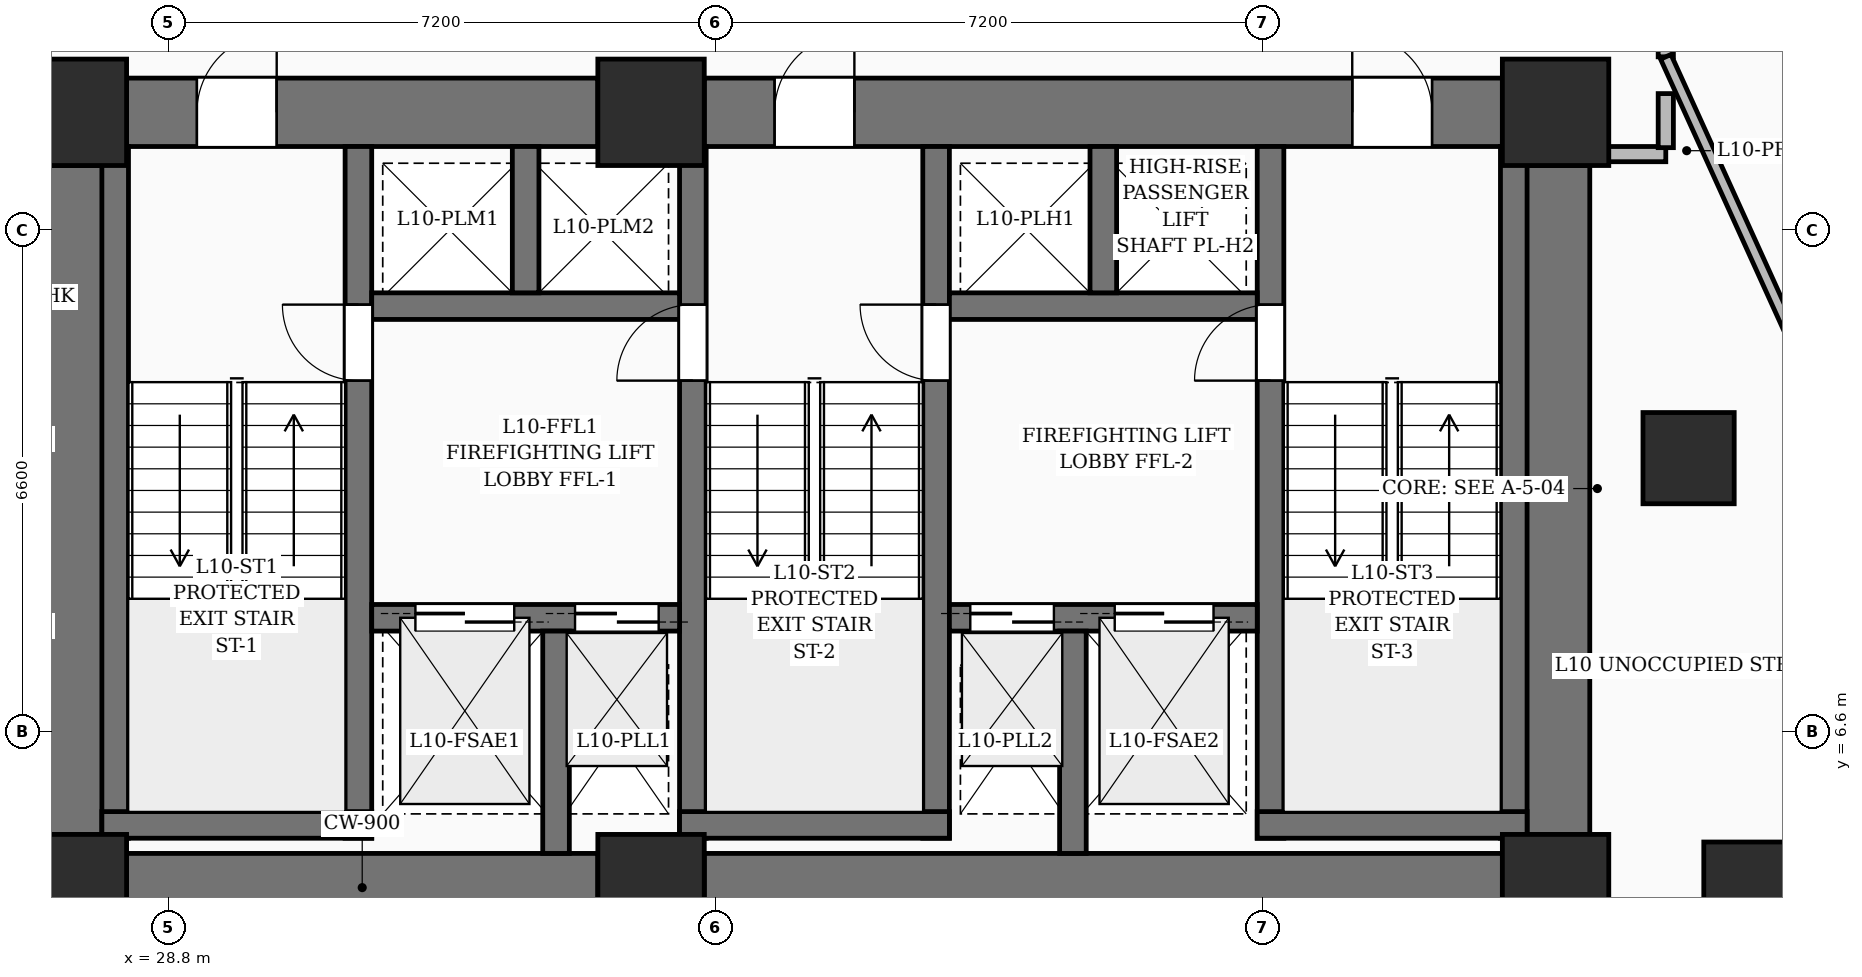
"""IFC4 building model, lengths in metres.
Left out: names, types, materials, properties, quantities, classifications, styles, units other than length and angle.
Written with IfcOpenShell. Run it as: python <this file> out.ifc"""

import sys

from ifc_helpers import new_model, si_unit, direction, frame, frame_2d, origin, origin_2d, place, context, subcontext, project, spatial, rectangle, extrude, element, fill, save


model = new_model("IFC4")
c1 = context("Model", 3, precision=1e-05, world=origin(), true_north=direction((0.0, 1.0)))
c2 = subcontext(c1, "Body", "Model", "MODEL_VIEW")
j1 = project(units=[si_unit("LENGTHUNIT", "METRE"), si_unit("PLANEANGLEUNIT", "RADIAN")], contexts=[c1])
p1 = place(None, origin())
s1 = spatial("IfcSite", under=j1, at=p1, CompositionType="ELEMENT")
p2 = place(p1, origin())
s2 = spatial("IfcBuilding", under=s1, at=p2, CompositionType="ELEMENT")
p3 = place(p2, frame((0.0, 0.0, 46.2)))
s3 = spatial("IfcBuildingStorey", under=s2, at=p3, CompositionType="ELEMENT", Elevation=46.2)
for number, where, z_axis, x_axis in (
    (1, (27.55, 4.55, 0.0), (0.0, 0.0, 1.0), (1.0, 0.0, 0.0)),
    (2, (35.15, 4.55, 0.0), (0.0, 0.0, 1.0), (1.0, 0.0, 0.0)),
    (3, (47.05, 4.55, 0.0), (0.0, 0.0, 1.0), (1.0, 0.0, 0.0)),
    (4, (27.55, 14.75, 0.0), (0.0, 0.0, 1.0), (1.0, 0.0, 0.0)),
    (5, (35.15, 14.75, 0.0), (0.0, 0.0, 1.0), (1.0, 0.0, 0.0)),
    (6, (47.05, 14.75, 0.0), (0.0, 0.0, 1.0), (1.0, 0.0, 0.0)),
):
    element("IfcColumn", number, at=place(p3, frame(where, z_axis=z_axis, x_axis=x_axis)), inside=s3, PredefinedType="COLUMN", context=c2, shape_type="SweptSolid", body=[
        extrude(rectangle(XDim=1.4, YDim=1.4, at=origin_2d()), origin(), (0.0, 0.0, 1.0), 3.6),
    ])
for number, where, z_axis, x_axis in (
    (7, (49.6, 4.55, 0.0), (0.0, 0.0, 1.0), (1.0, 0.0, 0.0)),
    (8, (48.8, 10.2, 0.0), (0.0, 0.0, 1.0), (1.0, 0.0, 0.0)),
):
    element("IfcColumn", number, at=place(p3, frame(where, z_axis=z_axis, x_axis=x_axis)), inside=s3, PredefinedType="COLUMN", context=c2, shape_type="SweptSolid", body=[
        extrude(rectangle(XDim=1.2, YDim=1.2, at=origin_2d()), origin(), (0.0, 0.0, 1.0), 3.6),
    ])
p4 = place(p3, frame((28.25, 4.55, 0.0), z_axis=(0.0, 0.0, 1.0), x_axis=(1.0, 0.0, 0.0)))
e9 = element("IfcWall", 9, at=p4, inside=s3, PredefinedType="SHEAR", context=c2, shape_type="SweptSolid", body=[
    extrude(rectangle(XDim=6.2, YDim=0.9, at=frame_2d((3.1, 0.0))), origin(), (0.0, 0.0, 1.0), 3.6),
])
p5 = place(p3, frame((35.85, 4.55, 0.0), z_axis=(0.0, 0.0, 1.0), x_axis=(1.0, 0.0, 0.0)))
e10 = element("IfcWall", 10, at=p5, inside=s3, PredefinedType="SHEAR", context=c2, shape_type="SweptSolid", body=[
    extrude(rectangle(XDim=10.5, YDim=0.9, at=frame_2d((5.25, 0.0))), origin(), (0.0, 0.0, 1.0), 3.6),
])
p6 = place(p3, frame((28.25, 14.75, 0.0), z_axis=(0.0, 0.0, 1.0), x_axis=(1.0, 0.0, 0.0)))
e11 = element("IfcWall", 11, at=p6, inside=s3, PredefinedType="SHEAR", context=c2, shape_type="SweptSolid", body=[
    extrude(rectangle(XDim=6.2, YDim=0.9, at=frame_2d((3.1, 0.0))), origin(), (0.0, 0.0, 1.0), 3.6),
])
p7 = place(p6, frame((0.925, 0.0, 0.0)))
e12 = element("IfcOpeningElement", 12, at=p7, cuts=e11, PredefinedType="OPENING", context=c2, shape_type="SweptSolid", body=[
    extrude(rectangle(XDim=1.05, YDim=2.15, at=frame_2d((0.525, 1.075))), frame((0.0, 0.46, 0.0), z_axis=(0.0, -1.0, 0.0), x_axis=(1.0, 0.0, 0.0)), (0.0, 0.0, 1.0), 0.92),
])
p8 = place(p3, frame((35.85, 14.75, 0.0), z_axis=(0.0, 0.0, 1.0), x_axis=(1.0, 0.0, 0.0)))
e13 = element("IfcWall", 13, at=p8, inside=s3, PredefinedType="SHEAR", context=c2, shape_type="SweptSolid", body=[
    extrude(rectangle(XDim=10.5, YDim=0.9, at=frame_2d((5.25, 0.0))), origin(), (0.0, 0.0, 1.0), 3.6),
])
p9 = place(p8, frame((0.925, 0.0, 0.0)))
e14 = element("IfcOpeningElement", 14, at=p9, cuts=e13, PredefinedType="OPENING", context=c2, shape_type="SweptSolid", body=[
    extrude(rectangle(XDim=1.05, YDim=2.15, at=frame_2d((0.525, 1.075))), frame((0.0, 0.46, 0.0), z_axis=(0.0, -1.0, 0.0), x_axis=(1.0, 0.0, 0.0)), (0.0, 0.0, 1.0), 0.92),
])
p10 = place(p8, frame((8.525, 0.0, 0.0)))
e15 = element("IfcOpeningElement", 15, at=p10, cuts=e13, PredefinedType="OPENING", context=c2, shape_type="SweptSolid", body=[
    extrude(rectangle(XDim=1.05, YDim=2.15, at=frame_2d((0.525, 1.075))), frame((0.0, 0.46, 0.0), z_axis=(0.0, -1.0, 0.0), x_axis=(1.0, 0.0, 0.0)), (0.0, 0.0, 1.0), 0.92),
])
for number, where, z_axis, x_axis in (
    (16, (27.55, 5.25, 0.0), (0.0, 0.0, 1.0), (0.0, 1.0, 0.0)),
    (17, (47.05, 5.25, 0.0), (0.0, 0.0, 1.0), (0.0, 1.0, 0.0)),
):
    element("IfcWall", number, at=place(p3, frame(where, z_axis=z_axis, x_axis=x_axis)), inside=s3, PredefinedType="SHEAR", context=c2, shape_type="SweptSolid", body=[
        extrude(rectangle(XDim=8.8, YDim=0.9, at=frame_2d((4.4, 0.0))), origin(), (0.0, 0.0, 1.0), 3.6),
    ])
p11 = place(p3, frame((28.1, 5.2, 0.0), z_axis=(0.0, 0.0, 1.0), x_axis=(0.0, 1.0, 0.0)))
e18 = element("IfcWall", 18, at=p11, inside=s3, PredefinedType="SOLIDWALL", context=c2, shape_type="SweptSolid", body=[
    extrude(rectangle(XDim=9.1, YDim=0.35, at=frame_2d((4.55, 0.0))), origin(), (0.0, 0.0, 1.0), 3.6),
])
p12 = place(p3, frame((31.3, 5.2, 0.0), z_axis=(0.0, 0.0, 1.0), x_axis=(0.0, 1.0, 0.0)))
e19 = element("IfcWall", 19, at=p12, inside=s3, PredefinedType="SOLIDWALL", context=c2, shape_type="SweptSolid", body=[
    extrude(rectangle(XDim=9.1, YDim=0.35, at=frame_2d((4.55, 0.0))), origin(), (0.0, 0.0, 1.0), 3.6),
])
p13 = place(p12, frame((6.02, 0.0, 0.0)))
e20 = element("IfcOpeningElement", 20, at=p13, cuts=e19, PredefinedType="OPENING", context=c2, shape_type="SweptSolid", body=[
    extrude(rectangle(XDim=1.0, YDim=2.15, at=frame_2d((0.5, 1.075))), frame((0.0, 0.185, 0.0), z_axis=(0.0, -1.0, 0.0), x_axis=(1.0, 0.0, 0.0)), (0.0, 0.0, 1.0), 0.37),
])
p14 = place(p3, frame((27.925, 5.375, 0.0), z_axis=(0.0, 0.0, 1.0), x_axis=(1.0, 0.0, 0.0)))
e21 = element("IfcWall", 21, at=p14, inside=s3, PredefinedType="SOLIDWALL", context=c2, shape_type="SweptSolid", body=[
    extrude(rectangle(XDim=3.55, YDim=0.35, at=frame_2d((1.775, 0.0))), origin(), (0.0, 0.0, 1.0), 3.6),
])
p15 = place(p3, frame((35.7, 5.2, 0.0), z_axis=(0.0, 0.0, 1.0), x_axis=(0.0, 1.0, 0.0)))
e22 = element("IfcWall", 22, at=p15, inside=s3, PredefinedType="SOLIDWALL", context=c2, shape_type="SweptSolid", body=[
    extrude(rectangle(XDim=9.1, YDim=0.35, at=frame_2d((4.55, 0.0))), origin(), (0.0, 0.0, 1.0), 3.6),
])
p16 = place(p15, frame((6.02, 0.0, 0.0)))
e23 = element("IfcOpeningElement", 23, at=p16, cuts=e22, PredefinedType="OPENING", context=c2, shape_type="SweptSolid", body=[
    extrude(rectangle(XDim=1.0, YDim=2.15, at=frame_2d((0.5, 1.075))), frame((0.0, 0.185, 0.0), z_axis=(0.0, -1.0, 0.0), x_axis=(1.0, 0.0, 0.0)), (0.0, 0.0, 1.0), 0.37),
])
p17 = place(p3, frame((38.9, 5.2, 0.0), z_axis=(0.0, 0.0, 1.0), x_axis=(0.0, 1.0, 0.0)))
e24 = element("IfcWall", 24, at=p17, inside=s3, PredefinedType="SOLIDWALL", context=c2, shape_type="SweptSolid", body=[
    extrude(rectangle(XDim=9.1, YDim=0.35, at=frame_2d((4.55, 0.0))), origin(), (0.0, 0.0, 1.0), 3.6),
])
p18 = place(p17, frame((6.02, 0.0, 0.0)))
e25 = element("IfcOpeningElement", 25, at=p18, cuts=e24, PredefinedType="OPENING", context=c2, shape_type="SweptSolid", body=[
    extrude(rectangle(XDim=1.0, YDim=2.15, at=frame_2d((0.5, 1.075))), frame((0.0, 0.185, 0.0), z_axis=(0.0, -1.0, 0.0), x_axis=(1.0, 0.0, 0.0)), (0.0, 0.0, 1.0), 0.37),
])
p19 = place(p3, frame((35.525, 5.375, 0.0), z_axis=(0.0, 0.0, 1.0), x_axis=(1.0, 0.0, 0.0)))
e26 = element("IfcWall", 26, at=p19, inside=s3, PredefinedType="SOLIDWALL", context=c2, shape_type="SweptSolid", body=[
    extrude(rectangle(XDim=3.55, YDim=0.35, at=frame_2d((1.775, 0.0))), origin(), (0.0, 0.0, 1.0), 3.6),
])
p20 = place(p3, frame((43.3, 5.2, 0.0), z_axis=(0.0, 0.0, 1.0), x_axis=(0.0, 1.0, 0.0)))
e27 = element("IfcWall", 27, at=p20, inside=s3, PredefinedType="SOLIDWALL", context=c2, shape_type="SweptSolid", body=[
    extrude(rectangle(XDim=9.1, YDim=0.35, at=frame_2d((4.55, 0.0))), origin(), (0.0, 0.0, 1.0), 3.6),
])
p21 = place(p20, frame((6.02, 0.0, 0.0)))
e28 = element("IfcOpeningElement", 28, at=p21, cuts=e27, PredefinedType="OPENING", context=c2, shape_type="SweptSolid", body=[
    extrude(rectangle(XDim=1.0, YDim=2.15, at=frame_2d((0.5, 1.075))), frame((0.0, 0.185, 0.0), z_axis=(0.0, -1.0, 0.0), x_axis=(1.0, 0.0, 0.0)), (0.0, 0.0, 1.0), 0.37),
])
p22 = place(p3, frame((46.5, 5.2, 0.0), z_axis=(0.0, 0.0, 1.0), x_axis=(0.0, 1.0, 0.0)))
e29 = element("IfcWall", 29, at=p22, inside=s3, PredefinedType="SOLIDWALL", context=c2, shape_type="SweptSolid", body=[
    extrude(rectangle(XDim=9.1, YDim=0.35, at=frame_2d((4.55, 0.0))), origin(), (0.0, 0.0, 1.0), 3.6),
])
p23 = place(p3, frame((43.125, 5.375, 0.0), z_axis=(0.0, 0.0, 1.0), x_axis=(1.0, 0.0, 0.0)))
e30 = element("IfcWall", 30, at=p23, inside=s3, PredefinedType="SOLIDWALL", context=c2, shape_type="SweptSolid", body=[
    extrude(rectangle(XDim=3.55, YDim=0.35, at=frame_2d((1.775, 0.0))), origin(), (0.0, 0.0, 1.0), 3.6),
])
p24 = place(p3, frame((31.475, 8.1, 0.0), z_axis=(0.0, 0.0, 1.0), x_axis=(1.0, 0.0, 0.0)))
e31 = element("IfcWall", 31, at=p24, inside=s3, PredefinedType="SOLIDWALL", context=c2, shape_type="SweptSolid", body=[
    extrude(rectangle(XDim=4.05, YDim=0.35, at=frame_2d((2.025, 0.0))), origin(), (0.0, 0.0, 1.0), 3.6),
])
p25 = place(p24, frame((0.575, 0.0, 0.0)))
e32 = element("IfcOpeningElement", 32, at=p25, cuts=e31, PredefinedType="OPENING", context=c2, shape_type="SweptSolid", body=[
    extrude(rectangle(XDim=1.3, YDim=2.25, at=frame_2d((0.65, 1.125))), frame((0.0, 0.185, 0.0), z_axis=(0.0, -1.0, 0.0), x_axis=(1.0, 0.0, 0.0)), (0.0, 0.0, 1.0), 0.37),
])
p26 = place(p24, frame((2.675, 0.0, 0.0)))
e33 = element("IfcOpeningElement", 33, at=p26, cuts=e31, PredefinedType="OPENING", context=c2, shape_type="SweptSolid", body=[
    extrude(rectangle(XDim=1.1, YDim=2.2, at=frame_2d((0.55, 1.1))), frame((0.0, 0.185, 0.0), z_axis=(0.0, -1.0, 0.0), x_axis=(1.0, 0.0, 0.0)), (0.0, 0.0, 1.0), 0.37),
])
p27 = place(p3, frame((39.075, 8.1, 0.0), z_axis=(0.0, 0.0, 1.0), x_axis=(1.0, 0.0, 0.0)))
e34 = element("IfcWall", 34, at=p27, inside=s3, PredefinedType="SOLIDWALL", context=c2, shape_type="SweptSolid", body=[
    extrude(rectangle(XDim=4.05, YDim=0.35, at=frame_2d((2.025, 0.0))), origin(), (0.0, 0.0, 1.0), 3.6),
])
p28 = place(p27, frame((2.175, 0.0, 0.0)))
e35 = element("IfcOpeningElement", 35, at=p28, cuts=e34, PredefinedType="OPENING", context=c2, shape_type="SweptSolid", body=[
    extrude(rectangle(XDim=1.3, YDim=2.25, at=frame_2d((0.65, 1.125))), frame((0.0, 0.185, 0.0), z_axis=(0.0, -1.0, 0.0), x_axis=(1.0, 0.0, 0.0)), (0.0, 0.0, 1.0), 0.37),
])
p29 = place(p27, frame((0.275, 0.0, 0.0)))
e36 = element("IfcOpeningElement", 36, at=p29, cuts=e34, PredefinedType="OPENING", context=c2, shape_type="SweptSolid", body=[
    extrude(rectangle(XDim=1.1, YDim=2.2, at=frame_2d((0.55, 1.1))), frame((0.0, 0.185, 0.0), z_axis=(0.0, -1.0, 0.0), x_axis=(1.0, 0.0, 0.0)), (0.0, 0.0, 1.0), 0.37),
])
for number, where, z_axis, x_axis in (
    (37, (33.9, 5.0, 0.0), (0.0, 0.0, 1.0), (0.0, 1.0, 0.0)),
    (38, (40.7, 5.0, 0.0), (0.0, 0.0, 1.0), (0.0, 1.0, 0.0)),
):
    element("IfcWall", number, at=place(p3, frame(where, z_axis=z_axis, x_axis=x_axis)), inside=s3, PredefinedType="SOLIDWALL", context=c2, shape_type="SweptSolid", body=[
        extrude(rectangle(XDim=2.925, YDim=0.35, at=frame_2d((1.462, 0.0))), origin(), (0.0, 0.0, 1.0), 3.6),
    ])
p30 = place(p3, frame((31.475, 12.2, 0.0), z_axis=(0.0, 0.0, 1.0), x_axis=(1.0, 0.0, 0.0)))
e39 = element("IfcWall", 39, at=p30, inside=s3, PredefinedType="SOLIDWALL", context=c2, shape_type="SweptSolid", body=[
    extrude(rectangle(XDim=4.05, YDim=0.35, at=frame_2d((2.025, 0.0))), origin(), (0.0, 0.0, 1.0), 3.6),
])
p31 = place(p3, frame((33.5, 12.375, 0.0), z_axis=(0.0, 0.0, 1.0), x_axis=(0.0, 1.0, 0.0)))
e40 = element("IfcWall", 40, at=p31, inside=s3, PredefinedType="SOLIDWALL", context=c2, shape_type="SweptSolid", body=[
    extrude(rectangle(XDim=1.925, YDim=0.35, at=frame_2d((0.962, 0.0))), origin(), (0.0, 0.0, 1.0), 3.6),
])
p32 = place(p3, frame((39.075, 12.2, 0.0), z_axis=(0.0, 0.0, 1.0), x_axis=(1.0, 0.0, 0.0)))
e41 = element("IfcWall", 41, at=p32, inside=s3, PredefinedType="SOLIDWALL", context=c2, shape_type="SweptSolid", body=[
    extrude(rectangle(XDim=4.05, YDim=0.35, at=frame_2d((2.025, 0.0))), origin(), (0.0, 0.0, 1.0), 3.6),
])
p33 = place(p3, frame((41.1, 12.375, 0.0), z_axis=(0.0, 0.0, 1.0), x_axis=(0.0, 1.0, 0.0)))
e42 = element("IfcWall", 42, at=p33, inside=s3, PredefinedType="SOLIDWALL", context=c2, shape_type="SweptSolid", body=[
    extrude(rectangle(XDim=1.925, YDim=0.35, at=frame_2d((0.962, 0.0))), origin(), (0.0, 0.0, 1.0), 3.6),
])
p34 = place(p3, frame((47.5, 14.2, 0.0), z_axis=(0.0, 0.0, 1.0), x_axis=(1.0, 0.0, 0.0)))
e43 = element("IfcWall", 43, at=p34, inside=s3, PredefinedType="PARTITIONING", context=c2, shape_type="SweptSolid", body=[
    extrude(rectangle(XDim=1.0, YDim=0.2, at=frame_2d((0.5, 0.0))), origin(), (0.0, 0.0, 1.0), 3.35),
])
p35 = place(p3, frame((48.5, 14.285, 0.0), z_axis=(0.0, 0.0, 1.0), x_axis=(0.0, 1.0, 0.0)))
e44 = element("IfcWall", 44, at=p35, inside=s3, PredefinedType="PARTITIONING", context=c2, shape_type="SweptSolid", body=[
    extrude(rectangle(XDim=0.711, YDim=0.2, at=frame_2d((0.355, 0.0))), origin(), (0.0, 0.0, 1.0), 3.35),
])
p36 = place(p3, frame((48.5, 15.48, 0.0), z_axis=(0.0, 0.0, 1.0), x_axis=(0.0, 1.0, 0.0)))
e45 = element("IfcWall", 45, at=p36, inside=s3, PredefinedType="PARTITIONING", context=c2, shape_type="SweptSolid", body=[
    extrude(rectangle(XDim=2.27, YDim=0.2, at=frame_2d((1.135, 0.0))), origin(), (0.0, 0.0, 1.0), 2.279),
])
p37 = place(p36, frame((0.685, 0.0, 0.0)))
e46 = element("IfcOpeningElement", 46, at=p37, cuts=e45, PredefinedType="OPENING", context=c2, shape_type="SweptSolid", body=[
    extrude(rectangle(XDim=0.9, YDim=2.1, at=frame_2d((0.45, 1.05))), frame((0.0, 0.11, 0.0), z_axis=(0.0, -1.0, 0.0), x_axis=(1.0, 0.0, 0.0)), (0.0, 0.0, 1.0), 0.22),
])
p38 = place(p3, frame((54.664, 1.903, 0.0), z_axis=(0.0, 0.0, 1.0), x_axis=(-0.413399508634, 0.910549749471, 0.0)))
e47 = element("IfcWall", 47, at=p38, inside=s3, PredefinedType="PARTITIONING", context=c2, shape_type="SweptSolid", body=[
    extrude(rectangle(XDim=14.911, YDim=0.15, at=frame_2d((7.455, 0.0))), origin(), (0.0, 0.0, 1.0), 2.279),
])
p39 = place(p7, origin())
e48 = element("IfcDoor", 48, at=p39, inside=s3, OperationType="SINGLE_SWING_RIGHT", PredefinedType="DOOR", context=c2, shape_type="SweptSolid", body=[
    extrude(rectangle(XDim=1.05, YDim=2.15, at=frame_2d((0.525, 1.075))), frame((0.0, 0.025, 0.0), z_axis=(0.0, -1.0, 0.0), x_axis=(1.0, 0.0, 0.0)), (0.0, 0.0, 1.0), 0.05),
])
fill(e12, e48)
p40 = place(p9, origin())
e49 = element("IfcDoor", 49, at=p40, inside=s3, OperationType="SINGLE_SWING_RIGHT", PredefinedType="DOOR", context=c2, shape_type="SweptSolid", body=[
    extrude(rectangle(XDim=1.05, YDim=2.15, at=frame_2d((0.525, 1.075))), frame((0.0, 0.025, 0.0), z_axis=(0.0, -1.0, 0.0), x_axis=(1.0, 0.0, 0.0)), (0.0, 0.0, 1.0), 0.05),
])
fill(e14, e49)
p41 = place(p10, origin())
e50 = element("IfcDoor", 50, at=p41, inside=s3, OperationType="SINGLE_SWING_LEFT", PredefinedType="DOOR", context=c2, shape_type="SweptSolid", body=[
    extrude(rectangle(XDim=1.05, YDim=2.15, at=frame_2d((0.525, 1.075))), frame((0.0, 0.025, 0.0), z_axis=(0.0, -1.0, 0.0), x_axis=(1.0, 0.0, 0.0)), (0.0, 0.0, 1.0), 0.05),
])
fill(e15, e50)
p42 = place(p13, origin())
e51 = element("IfcDoor", 51, at=p42, inside=s3, OperationType="SINGLE_SWING_RIGHT", PredefinedType="DOOR", context=c2, shape_type="SweptSolid", body=[
    extrude(rectangle(XDim=1.0, YDim=2.15, at=frame_2d((0.5, 1.075))), frame((0.0, 0.025, 0.0), z_axis=(0.0, -1.0, 0.0), x_axis=(1.0, 0.0, 0.0)), (0.0, 0.0, 1.0), 0.05),
])
fill(e20, e51)
p43 = place(p16, origin())
e52 = element("IfcDoor", 52, at=p43, inside=s3, OperationType="SINGLE_SWING_LEFT", PredefinedType="DOOR", context=c2, shape_type="SweptSolid", body=[
    extrude(rectangle(XDim=1.0, YDim=2.15, at=frame_2d((0.5, 1.075))), frame((0.0, 0.025, 0.0), z_axis=(0.0, -1.0, 0.0), x_axis=(1.0, 0.0, 0.0)), (0.0, 0.0, 1.0), 0.05),
])
fill(e23, e52)
p44 = place(p18, origin())
e53 = element("IfcDoor", 53, at=p44, inside=s3, OperationType="SINGLE_SWING_RIGHT", PredefinedType="DOOR", context=c2, shape_type="SweptSolid", body=[
    extrude(rectangle(XDim=1.0, YDim=2.15, at=frame_2d((0.5, 1.075))), frame((0.0, 0.025, 0.0), z_axis=(0.0, -1.0, 0.0), x_axis=(1.0, 0.0, 0.0)), (0.0, 0.0, 1.0), 0.05),
])
fill(e25, e53)
p45 = place(p21, origin())
e54 = element("IfcDoor", 54, at=p45, inside=s3, OperationType="SINGLE_SWING_LEFT", PredefinedType="DOOR", context=c2, shape_type="SweptSolid", body=[
    extrude(rectangle(XDim=1.0, YDim=2.15, at=frame_2d((0.5, 1.075))), frame((0.0, 0.025, 0.0), z_axis=(0.0, -1.0, 0.0), x_axis=(1.0, 0.0, 0.0)), (0.0, 0.0, 1.0), 0.05),
])
fill(e28, e54)
p46 = place(p25, origin())
e55 = element("IfcDoor", 55, at=p46, inside=s3, OperationType="DOUBLE_DOOR_SLIDING", PredefinedType="DOOR", context=c2, shape_type="SweptSolid", body=[
    extrude(rectangle(XDim=1.3, YDim=2.25, at=frame_2d((0.65, 1.125))), frame((0.0, 0.025, 0.0), z_axis=(0.0, -1.0, 0.0), x_axis=(1.0, 0.0, 0.0)), (0.0, 0.0, 1.0), 0.05),
])
fill(e32, e55)
p47 = place(p28, origin())
e56 = element("IfcDoor", 56, at=p47, inside=s3, OperationType="DOUBLE_DOOR_SLIDING", PredefinedType="DOOR", context=c2, shape_type="SweptSolid", body=[
    extrude(rectangle(XDim=1.3, YDim=2.25, at=frame_2d((0.65, 1.125))), frame((0.0, 0.025, 0.0), z_axis=(0.0, -1.0, 0.0), x_axis=(1.0, 0.0, 0.0)), (0.0, 0.0, 1.0), 0.05),
])
fill(e35, e56)
p48 = place(p26, origin())
e57 = element("IfcDoor", 57, at=p48, inside=s3, OperationType="DOUBLE_DOOR_SLIDING", PredefinedType="DOOR", context=c2, shape_type="SweptSolid", body=[
    extrude(rectangle(XDim=1.1, YDim=2.2, at=frame_2d((0.55, 1.1))), frame((0.0, 0.025, 0.0), z_axis=(0.0, -1.0, 0.0), x_axis=(1.0, 0.0, 0.0)), (0.0, 0.0, 1.0), 0.05),
])
fill(e33, e57)
p49 = place(p29, origin())
e58 = element("IfcDoor", 58, at=p49, inside=s3, OperationType="DOUBLE_DOOR_SLIDING", PredefinedType="DOOR", context=c2, shape_type="SweptSolid", body=[
    extrude(rectangle(XDim=1.1, YDim=2.2, at=frame_2d((0.55, 1.1))), frame((0.0, 0.025, 0.0), z_axis=(0.0, -1.0, 0.0), x_axis=(1.0, 0.0, 0.0)), (0.0, 0.0, 1.0), 0.05),
])
fill(e36, e58)
save(model, sys.argv[1])
